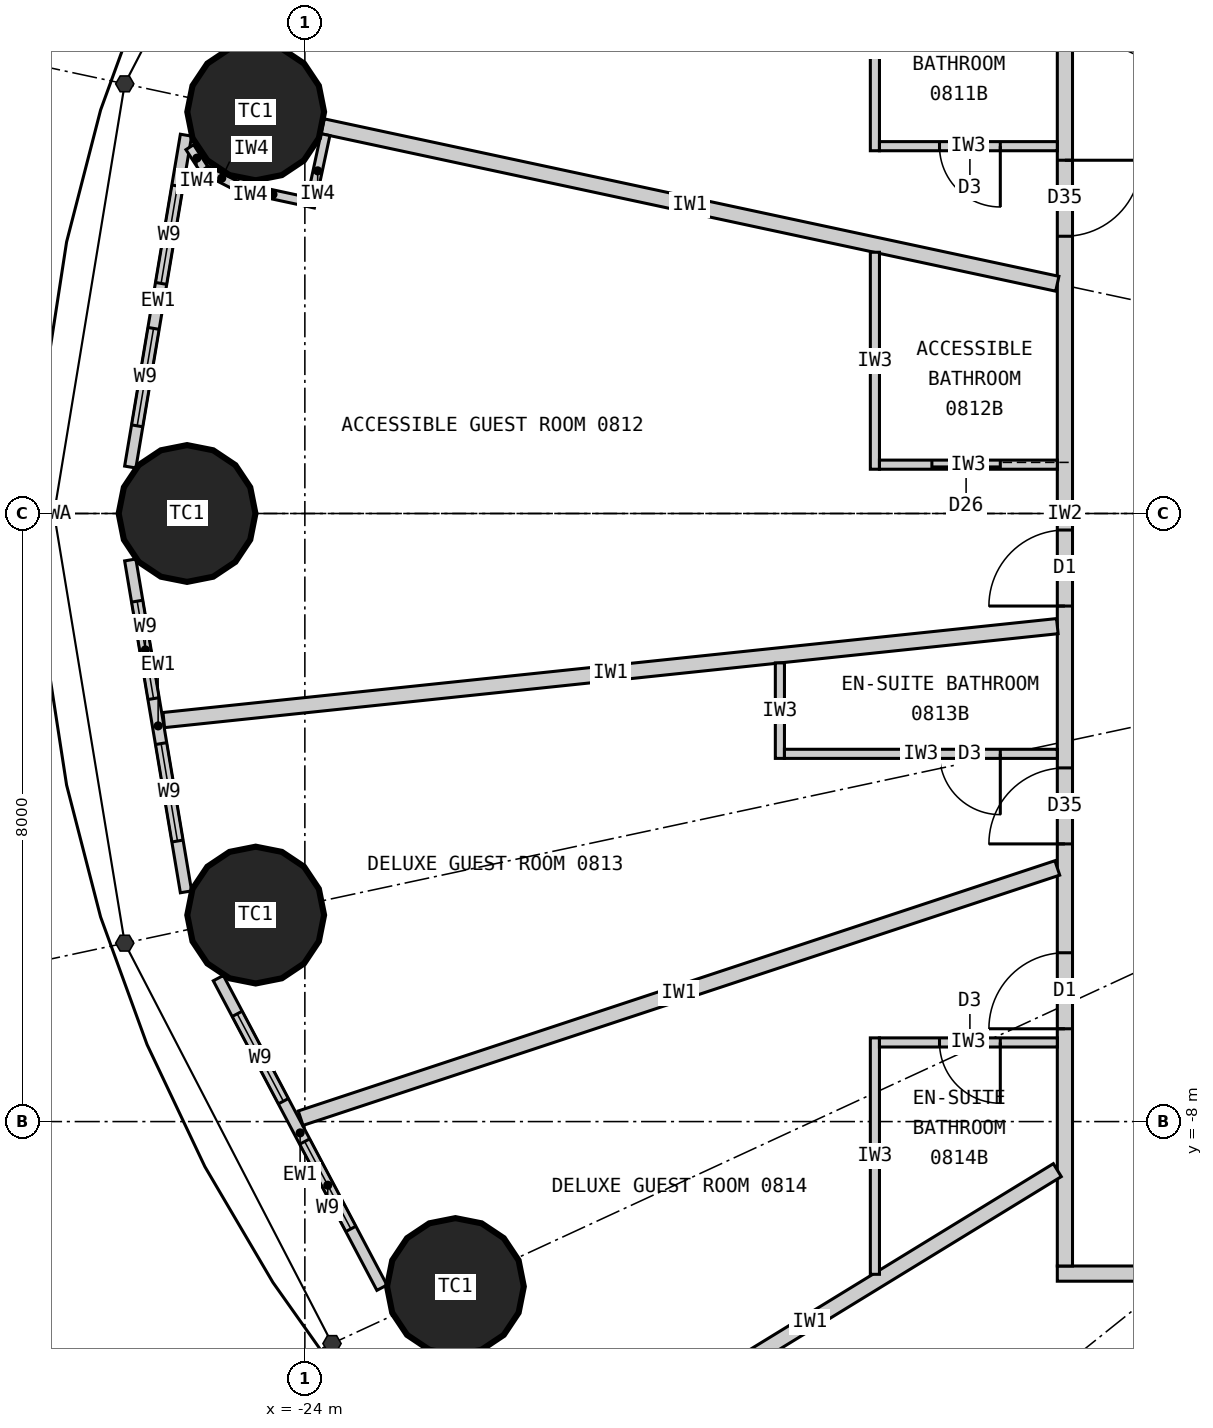
"""IFC4 building model, lengths in metres.
Left out: names, types, materials, properties, quantities, classifications, styles, units other than length and angle.
Written with IfcOpenShell. Run it as: python <this file> out.ifc"""

import sys

from ifc_helpers import new_model, si_unit, direction, frame, frame_2d, origin, origin_2d, place, context, subcontext, project, spatial, rectangle, circle, extrude, element, fill, save


model = new_model("IFC4")
c1 = context("Model", 3, precision=1e-05, world=origin(), true_north=direction((0.0, 1.0)))
c2 = subcontext(c1, "Body", "Model", "MODEL_VIEW")
j1 = project(units=[si_unit("LENGTHUNIT", "METRE"), si_unit("PLANEANGLEUNIT", "RADIAN")], contexts=[c1])
p1 = place(None, origin())
s1 = spatial("IfcSite", under=j1, at=p1, CompositionType="ELEMENT")
p2 = place(p1, origin())
s2 = spatial("IfcBuilding", under=s1, at=p2, CompositionType="ELEMENT")
p3 = place(p2, frame((0.0, 0.0, 39.3)))
s3 = spatial("IfcBuildingStorey", under=s2, at=p3, CompositionType="ELEMENT", Elevation=39.3)
for number, where, z_axis, x_axis in (
    (1, (-24.647, 5.283, 0.0), (0.0, 0.0, 1.0), (1.0, 0.0, 0.0)),
    (2, (-25.55, 0.0, 0.0), (0.0, 0.0, 1.0), (1.0, 0.0, 0.0)),
    (3, (-24.647, -5.283, 0.0), (0.0, 0.0, 1.0), (1.0, 0.0, 0.0)),
    (4, (-22.019, -10.17, 0.0), (0.0, 0.0, 1.0), (1.0, 0.0, 0.0)),
):
    element("IfcColumn", number, at=place(p3, frame(where, z_axis=z_axis, x_axis=x_axis)), inside=s3, PredefinedType="COLUMN", context=c2, shape_type="SweptSolid", body=[
        extrude(circle(Radius=0.9, at=origin_2d()), origin(), (0.0, 0.0, 1.0), 3.3),
    ])
p4 = place(p3, frame((-25.564, 4.978, 0.0), z_axis=(0.0, 0.0, 1.0), x_axis=(-0.165641751141, -0.986185991727, 0.0)))
e5 = element("IfcWall", 5, at=p4, inside=s3, PredefinedType="ELEMENTEDWALL", context=c2, shape_type="SweptSolid", body=[
    extrude(rectangle(XDim=4.428, YDim=0.15, at=frame_2d((2.214, 0.0))), origin(), (0.0, 0.0, 1.0), 3.12),
])
p5 = place(p4, frame((0.678, 0.0, 0.9)))
e6 = element("IfcOpeningElement", 6, at=p5, cuts=e5, PredefinedType="OPENING", context=c2, shape_type="SweptSolid", body=[
    extrude(rectangle(XDim=1.3, YDim=1.9, at=frame_2d((0.65, 0.95))), frame((0.0, 0.085, 0.0), z_axis=(0.0, -1.0, 0.0), x_axis=(1.0, 0.0, 0.0)), (0.0, 0.0, 1.0), 0.17),
])
p6 = place(p4, frame((2.578, 0.0, 0.9)))
e7 = element("IfcOpeningElement", 7, at=p6, cuts=e5, PredefinedType="OPENING", context=c2, shape_type="SweptSolid", body=[
    extrude(rectangle(XDim=1.3, YDim=1.9, at=frame_2d((0.65, 0.95))), frame((0.0, 0.085, 0.0), z_axis=(0.0, -1.0, 0.0), x_axis=(1.0, 0.0, 0.0)), (0.0, 0.0, 1.0), 0.17),
])
p7 = place(p3, frame((-26.297, -0.611, 0.0), z_axis=(0.0, 0.0, 1.0), x_axis=(0.165641751141, -0.986185991727, 0.0)))
e8 = element("IfcWall", 8, at=p7, inside=s3, PredefinedType="ELEMENTEDWALL", context=c2, shape_type="SweptSolid", body=[
    extrude(rectangle(XDim=4.428, YDim=0.15, at=frame_2d((2.214, 0.0))), origin(), (0.0, 0.0, 1.0), 3.12),
])
p8 = place(p7, frame((0.55, 0.0, 0.9)))
e9 = element("IfcOpeningElement", 9, at=p8, cuts=e8, PredefinedType="OPENING", context=c2, shape_type="SweptSolid", body=[
    extrude(rectangle(XDim=1.3, YDim=1.9, at=frame_2d((0.65, 0.95))), frame((0.0, 0.085, 0.0), z_axis=(0.0, -1.0, 0.0), x_axis=(1.0, 0.0, 0.0)), (0.0, 0.0, 1.0), 0.17),
])
p9 = place(p7, frame((2.45, 0.0, 0.9)))
e10 = element("IfcOpeningElement", 10, at=p9, cuts=e8, PredefinedType="OPENING", context=c2, shape_type="SweptSolid", body=[
    extrude(rectangle(XDim=1.3, YDim=1.9, at=frame_2d((0.65, 0.95))), frame((0.0, 0.085, 0.0), z_axis=(0.0, -1.0, 0.0), x_axis=(1.0, 0.0, 0.0)), (0.0, 0.0, 1.0), 0.17),
])
p10 = place(p3, frame((-25.139, -6.113, 0.0), z_axis=(0.0, 0.0, 1.0), x_axis=(0.467303182954, -0.884097129959, 0.0)))
e11 = element("IfcWall", 11, at=p10, inside=s3, PredefinedType="ELEMENTEDWALL", context=c2, shape_type="SweptSolid", body=[
    extrude(rectangle(XDim=4.606, YDim=0.15, at=frame_2d((2.303, 0.0))), origin(), (0.0, 0.0, 1.0), 3.12),
])
p11 = place(p10, frame((0.531, 0.0, 0.9)))
e12 = element("IfcOpeningElement", 12, at=p11, cuts=e11, PredefinedType="OPENING", context=c2, shape_type="SweptSolid", body=[
    extrude(rectangle(XDim=1.3, YDim=1.9, at=frame_2d((0.65, 0.95))), frame((0.0, 0.085, 0.0), z_axis=(0.0, -1.0, 0.0), x_axis=(1.0, 0.0, 0.0)), (0.0, 0.0, 1.0), 0.17),
])
p12 = place(p10, frame((2.432, 0.0, 0.9)))
e13 = element("IfcOpeningElement", 13, at=p12, cuts=e11, PredefinedType="OPENING", context=c2, shape_type="SweptSolid", body=[
    extrude(rectangle(XDim=1.3, YDim=1.9, at=frame_2d((0.65, 0.95))), frame((0.0, 0.085, 0.0), z_axis=(0.0, -1.0, 0.0), x_axis=(1.0, 0.0, 0.0)), (0.0, 0.0, 1.0), 0.17),
])
p13 = place(p3, frame((14.1, -10.0, 0.0), z_axis=(0.0, 0.0, 1.0), x_axis=(-1.0, 0.0, 0.0)))
e14 = element("IfcWall", 14, at=p13, inside=s3, PredefinedType="PARTITIONING", context=c2, shape_type="SweptSolid", body=[
    extrude(rectangle(XDim=28.2, YDim=0.2, at=frame_2d((14.1, 0.0))), origin(), (0.0, 0.0, 1.0), 3.12),
])
p14 = place(p13, frame((21.948, 0.0, 0.0)))
e15 = element("IfcOpeningElement", 15, at=p14, cuts=e14, PredefinedType="OPENING", context=c2, shape_type="SweptSolid", body=[
    extrude(rectangle(XDim=1.0, YDim=2.2, at=frame_2d((0.5, 1.1))), frame((0.0, 0.11, 0.0), z_axis=(0.0, -1.0, 0.0), x_axis=(1.0, 0.0, 0.0)), (0.0, 0.0, 1.0), 0.22),
])
p15 = place(p13, frame((15.684, 0.0, 0.0)))
e16 = element("IfcOpeningElement", 16, at=p15, cuts=e14, PredefinedType="OPENING", context=c2, shape_type="SweptSolid", body=[
    extrude(rectangle(XDim=1.0, YDim=2.2, at=frame_2d((0.5, 1.1))), frame((0.0, 0.11, 0.0), z_axis=(0.0, -1.0, 0.0), x_axis=(1.0, 0.0, 0.0)), (0.0, 0.0, 1.0), 0.22),
])
p16 = place(p13, frame((8.875, 0.0, 0.0)))
e17 = element("IfcOpeningElement", 17, at=p16, cuts=e14, PredefinedType="OPENING", context=c2, shape_type="SweptSolid", body=[
    extrude(rectangle(XDim=1.0, YDim=2.2, at=frame_2d((0.5, 1.1))), frame((0.0, 0.11, 0.0), z_axis=(0.0, -1.0, 0.0), x_axis=(1.0, 0.0, 0.0)), (0.0, 0.0, 1.0), 0.22),
])
p17 = place(p3, frame((-14.0, 9.9, 0.0), z_axis=(0.0, 0.0, 1.0), x_axis=(0.0, -1.0, 0.0)))
e18 = element("IfcWall", 18, at=p17, inside=s3, PredefinedType="PARTITIONING", context=c2, shape_type="SweptSolid", body=[
    extrude(rectangle(XDim=19.8, YDim=0.2, at=frame_2d((9.9, 0.0))), origin(), (0.0, 0.0, 1.0), 3.12),
])
p18 = place(p17, frame((0.103, 0.0, 0.0)))
e19 = element("IfcOpeningElement", 19, at=p18, cuts=e18, PredefinedType="OPENING", context=c2, shape_type="SweptSolid", body=[
    extrude(rectangle(XDim=1.0, YDim=2.2, at=frame_2d((0.5, 1.1))), frame((0.0, 0.11, 0.0), z_axis=(0.0, -1.0, 0.0), x_axis=(1.0, 0.0, 0.0)), (0.0, 0.0, 1.0), 0.22),
])
p19 = place(p17, frame((5.252, 0.0, 0.0)))
e20 = element("IfcOpeningElement", 20, at=p19, cuts=e18, PredefinedType="OPENING", context=c2, shape_type="SweptSolid", body=[
    extrude(rectangle(XDim=1.0, YDim=2.0, at=frame_2d((0.5, 1.0))), frame((0.0, 0.11, 0.0), z_axis=(0.0, -1.0, 0.0), x_axis=(1.0, 0.0, 0.0)), (0.0, 0.0, 1.0), 0.22),
])
p20 = place(p17, frame((10.117, 0.0, 0.0)))
e21 = element("IfcOpeningElement", 21, at=p20, cuts=e18, PredefinedType="OPENING", context=c2, shape_type="SweptSolid", body=[
    extrude(rectangle(XDim=1.0, YDim=2.2, at=frame_2d((0.5, 1.1))), frame((0.0, 0.11, 0.0), z_axis=(0.0, -1.0, 0.0), x_axis=(1.0, 0.0, 0.0)), (0.0, 0.0, 1.0), 0.22),
])
p21 = place(p17, frame((13.247, 0.0, 0.0)))
e22 = element("IfcOpeningElement", 22, at=p21, cuts=e18, PredefinedType="OPENING", context=c2, shape_type="SweptSolid", body=[
    extrude(rectangle(XDim=1.0, YDim=2.0, at=frame_2d((0.5, 1.0))), frame((0.0, 0.11, 0.0), z_axis=(0.0, -1.0, 0.0), x_axis=(1.0, 0.0, 0.0)), (0.0, 0.0, 1.0), 0.22),
])
p22 = place(p17, frame((15.679, 0.0, 0.0)))
e23 = element("IfcOpeningElement", 23, at=p22, cuts=e18, PredefinedType="OPENING", context=c2, shape_type="SweptSolid", body=[
    extrude(rectangle(XDim=1.0, YDim=2.2, at=frame_2d((0.5, 1.1))), frame((0.0, 0.11, 0.0), z_axis=(0.0, -1.0, 0.0), x_axis=(1.0, 0.0, 0.0)), (0.0, 0.0, 1.0), 0.22),
])
p23 = place(p3, frame((-14.1, 3.022, 0.0), z_axis=(0.0, 0.0, 1.0), x_axis=(-0.977786510688, 0.209603290805, 0.0)))
e24 = element("IfcWall", 24, at=p23, inside=s3, PredefinedType="PARTITIONING", context=c2, shape_type="SweptSolid", body=[
    extrude(rectangle(XDim=9.887, YDim=0.2, at=frame_2d((4.943, 0.0))), origin(), (0.0, 0.0, 1.0), 2.32),
])
p24 = place(p3, frame((-14.1, -1.482, 0.0), z_axis=(0.0, 0.0, 1.0), x_axis=(-0.994522076235, -0.104526742422, 0.0)))
e25 = element("IfcWall", 25, at=p24, inside=s3, PredefinedType="PARTITIONING", context=c2, shape_type="SweptSolid", body=[
    extrude(rectangle(XDim=11.821, YDim=0.2, at=frame_2d((5.91, 0.0))), origin(), (0.0, 0.0, 1.0), 2.32),
])
p25 = place(p3, frame((-14.1, -4.663, 0.0), z_axis=(0.0, 0.0, 1.0), x_axis=(-0.949432655039, -0.31397075269, 0.0)))
e26 = element("IfcWall", 26, at=p25, inside=s3, PredefinedType="PARTITIONING", context=c2, shape_type="SweptSolid", body=[
    extrude(rectangle(XDim=10.486, YDim=0.2, at=frame_2d((5.243, 0.0))), origin(), (0.0, 0.0, 1.0), 3.12),
])
p26 = place(p3, frame((-14.1, -8.639, 0.0), z_axis=(0.0, 0.0, 1.0), x_axis=(-0.852672493023, -0.522445805459, 0.0)))
e27 = element("IfcWall", 27, at=p26, inside=s3, PredefinedType="PARTITIONING", context=c2, shape_type="SweptSolid", body=[
    extrude(rectangle(XDim=7.633, YDim=0.2, at=frame_2d((3.817, 0.0))), origin(), (0.0, 0.0, 1.0), 3.12),
])
p27 = place(p3, frame((-16.5, 7.521, 0.0), z_axis=(0.0, 0.0, 1.0), x_axis=(0.0, -1.0, 0.0)))
e28 = element("IfcWall", 28, at=p27, inside=s3, PredefinedType="PARTITIONING", context=c2, shape_type="SweptSolid", body=[
    extrude(rectangle(XDim=2.749, YDim=0.12, at=frame_2d((1.374, 0.0))), origin(), (0.0, 0.0, 1.0), 3.12),
])
p28 = place(p3, frame((-14.1, 4.833, 0.0), z_axis=(0.0, 0.0, 1.0), x_axis=(-1.0, 0.0, 0.0)))
e29 = element("IfcWall", 29, at=p28, inside=s3, PredefinedType="PARTITIONING", context=c2, shape_type="SweptSolid", body=[
    extrude(rectangle(XDim=2.34, YDim=0.12, at=frame_2d((1.17, 0.0))), origin(), (0.0, 0.0, 1.0), 3.12),
])
p29 = place(p28, frame((0.75, 0.0, 0.0)))
e30 = element("IfcOpeningElement", 30, at=p29, cuts=e29, PredefinedType="OPENING", context=c2, shape_type="SweptSolid", body=[
    extrude(rectangle(XDim=0.8, YDim=2.1, at=frame_2d((0.4, 1.05))), frame((0.0, 0.07, 0.0), z_axis=(0.0, -1.0, 0.0), x_axis=(1.0, 0.0, 0.0)), (0.0, 0.0, 1.0), 0.14),
])
p30 = place(p3, frame((-16.5, 3.437, 0.0), z_axis=(0.0, 0.0, 1.0), x_axis=(0.0, -1.0, 0.0)))
e31 = element("IfcWall", 31, at=p30, inside=s3, PredefinedType="PARTITIONING", context=c2, shape_type="SweptSolid", body=[
    extrude(rectangle(XDim=2.854, YDim=0.12, at=frame_2d((1.427, 0.0))), origin(), (0.0, 0.0, 1.0), 3.12),
])
p31 = place(p3, frame((-14.1, 0.643, 0.0), z_axis=(0.0, 0.0, 1.0), x_axis=(-1.0, 0.0, 0.0)))
e32 = element("IfcWall", 32, at=p31, inside=s3, PredefinedType="PARTITIONING", context=c2, shape_type="SweptSolid", body=[
    extrude(rectangle(XDim=2.34, YDim=0.12, at=frame_2d((1.17, 0.0))), origin(), (0.0, 0.0, 1.0), 3.12),
])
p32 = place(p31, frame((0.75, 0.0, 0.0)))
e33 = element("IfcOpeningElement", 33, at=p32, cuts=e32, PredefinedType="OPENING", context=c2, shape_type="SweptSolid", body=[
    extrude(rectangle(XDim=0.9, YDim=2.1, at=frame_2d((0.45, 1.05))), frame((0.0, 0.07, 0.0), z_axis=(0.0, -1.0, 0.0), x_axis=(1.0, 0.0, 0.0)), (0.0, 0.0, 1.0), 0.14),
])
p33 = place(p3, frame((-17.75, -1.966, 0.0), z_axis=(0.0, 0.0, 1.0), x_axis=(0.0, -1.0, 0.0)))
e34 = element("IfcWall", 34, at=p33, inside=s3, PredefinedType="PARTITIONING", context=c2, shape_type="SweptSolid", body=[
    extrude(rectangle(XDim=1.256, YDim=0.12, at=frame_2d((0.628, 0.0))), origin(), (0.0, 0.0, 1.0), 3.12),
])
p34 = place(p3, frame((-14.1, -3.162, 0.0), z_axis=(0.0, 0.0, 1.0), x_axis=(-1.0, 0.0, 0.0)))
e35 = element("IfcWall", 35, at=p34, inside=s3, PredefinedType="PARTITIONING", context=c2, shape_type="SweptSolid", body=[
    extrude(rectangle(XDim=3.59, YDim=0.12, at=frame_2d((1.795, 0.0))), origin(), (0.0, 0.0, 1.0), 3.12),
])
p35 = place(p34, frame((0.75, 0.0, 0.0)))
e36 = element("IfcOpeningElement", 36, at=p35, cuts=e35, PredefinedType="OPENING", context=c2, shape_type="SweptSolid", body=[
    extrude(rectangle(XDim=0.8, YDim=2.1, at=frame_2d((0.4, 1.05))), frame((0.0, 0.07, 0.0), z_axis=(0.0, -1.0, 0.0), x_axis=(1.0, 0.0, 0.0)), (0.0, 0.0, 1.0), 0.14),
])
p36 = place(p3, frame((-16.5, -10.01, 0.0), z_axis=(0.0, 0.0, 1.0), x_axis=(0.0, 1.0, 0.0)))
e37 = element("IfcWall", 37, at=p36, inside=s3, PredefinedType="PARTITIONING", context=c2, shape_type="SweptSolid", body=[
    extrude(rectangle(XDim=3.111, YDim=0.12, at=frame_2d((1.555, 0.0))), origin(), (0.0, 0.0, 1.0), 3.12),
])
p37 = place(p3, frame((-14.1, -6.959, 0.0), z_axis=(0.0, 0.0, 1.0), x_axis=(-1.0, 0.0, 0.0)))
e38 = element("IfcWall", 38, at=p37, inside=s3, PredefinedType="PARTITIONING", context=c2, shape_type="SweptSolid", body=[
    extrude(rectangle(XDim=2.34, YDim=0.12, at=frame_2d((1.17, 0.0))), origin(), (0.0, 0.0, 1.0), 3.12),
])
p38 = place(p37, frame((0.75, 0.0, 0.0)))
e39 = element("IfcOpeningElement", 39, at=p38, cuts=e38, PredefinedType="OPENING", context=c2, shape_type="SweptSolid", body=[
    extrude(rectangle(XDim=0.8, YDim=2.1, at=frame_2d((0.4, 1.05))), frame((0.0, 0.07, 0.0), z_axis=(0.0, -1.0, 0.0), x_axis=(1.0, 0.0, 0.0)), (0.0, 0.0, 1.0), 0.14),
])
p39 = place(p3, frame((-23.729, 4.984, 0.0), z_axis=(0.0, 0.0, 1.0), x_axis=(-0.20968306268, -0.977769406979, 0.0)))
e40 = element("IfcWall", 40, at=p39, inside=s3, PredefinedType="PARTITIONING", context=c2, shape_type="SweptSolid", body=[
    extrude(rectangle(XDim=0.975, YDim=0.12, at=frame_2d((0.487, 0.0))), origin(), (0.0, 0.0, 1.0), 3.12),
])
p40 = place(p3, frame((-23.98, 4.103, 0.0), z_axis=(0.0, 0.0, 1.0), x_axis=(-0.977762694187, 0.209714362543, 0.0)))
e41 = element("IfcWall", 41, at=p40, inside=s3, PredefinedType="PARTITIONING", context=c2, shape_type="SweptSolid", body=[
    extrude(rectangle(XDim=0.9, YDim=0.12, at=frame_2d((0.45, 0.0))), origin(), (0.0, 0.0, 1.0), 3.12),
])
p41 = place(p3, frame((-24.86, 4.291, 0.0), z_axis=(0.0, 0.0, 1.0), x_axis=(-0.890204323062, 0.455561481254, 0.0)))
e42 = element("IfcWall", 42, at=p41, inside=s3, PredefinedType="PARTITIONING", context=c2, shape_type="SweptSolid", body=[
    extrude(rectangle(XDim=0.525, YDim=0.12, at=frame_2d((0.263, 0.0))), origin(), (0.0, 0.0, 1.0), 3.12),
])
p42 = place(p3, frame((-25.327, 4.531, 0.0), z_axis=(0.0, 0.0, 1.0), x_axis=(-0.543516034791, 0.839398784801, 0.0)))
e43 = element("IfcWall", 43, at=p42, inside=s3, PredefinedType="PARTITIONING", context=c2, shape_type="SweptSolid", body=[
    extrude(rectangle(XDim=0.344, YDim=0.12, at=frame_2d((0.172, 0.0))), origin(), (0.0, 0.0, 1.0), 3.12),
])
p43 = place(p5, origin())
e44 = element("IfcWindow", 44, at=p43, inside=s3, PartitioningType="SINGLE_PANEL", PredefinedType="WINDOW", context=c2, shape_type="SweptSolid", body=[
    extrude(rectangle(XDim=1.3, YDim=1.9, at=frame_2d((0.65, 0.95))), frame((0.0, 0.03, 0.0), z_axis=(0.0, -1.0, 0.0), x_axis=(1.0, 0.0, 0.0)), (0.0, 0.0, 1.0), 0.06),
])
fill(e6, e44)
p44 = place(p6, origin())
e45 = element("IfcWindow", 45, at=p44, inside=s3, PartitioningType="SINGLE_PANEL", PredefinedType="WINDOW", context=c2, shape_type="SweptSolid", body=[
    extrude(rectangle(XDim=1.3, YDim=1.9, at=frame_2d((0.65, 0.95))), frame((0.0, 0.03, 0.0), z_axis=(0.0, -1.0, 0.0), x_axis=(1.0, 0.0, 0.0)), (0.0, 0.0, 1.0), 0.06),
])
fill(e7, e45)
p45 = place(p8, origin())
e46 = element("IfcWindow", 46, at=p45, inside=s3, PartitioningType="SINGLE_PANEL", PredefinedType="WINDOW", context=c2, shape_type="SweptSolid", body=[
    extrude(rectangle(XDim=1.3, YDim=1.9, at=frame_2d((0.65, 0.95))), frame((0.0, 0.03, 0.0), z_axis=(0.0, -1.0, 0.0), x_axis=(1.0, 0.0, 0.0)), (0.0, 0.0, 1.0), 0.06),
])
fill(e9, e46)
p46 = place(p9, origin())
e47 = element("IfcWindow", 47, at=p46, inside=s3, PartitioningType="SINGLE_PANEL", PredefinedType="WINDOW", context=c2, shape_type="SweptSolid", body=[
    extrude(rectangle(XDim=1.3, YDim=1.9, at=frame_2d((0.65, 0.95))), frame((0.0, 0.03, 0.0), z_axis=(0.0, -1.0, 0.0), x_axis=(1.0, 0.0, 0.0)), (0.0, 0.0, 1.0), 0.06),
])
fill(e10, e47)
p47 = place(p11, origin())
e48 = element("IfcWindow", 48, at=p47, inside=s3, PartitioningType="SINGLE_PANEL", PredefinedType="WINDOW", context=c2, shape_type="SweptSolid", body=[
    extrude(rectangle(XDim=1.3, YDim=1.9, at=frame_2d((0.65, 0.95))), frame((0.0, 0.03, 0.0), z_axis=(0.0, -1.0, 0.0), x_axis=(1.0, 0.0, 0.0)), (0.0, 0.0, 1.0), 0.06),
])
fill(e12, e48)
p48 = place(p12, origin())
e49 = element("IfcWindow", 49, at=p48, inside=s3, PartitioningType="SINGLE_PANEL", PredefinedType="WINDOW", context=c2, shape_type="SweptSolid", body=[
    extrude(rectangle(XDim=1.3, YDim=1.9, at=frame_2d((0.65, 0.95))), frame((0.0, 0.03, 0.0), z_axis=(0.0, -1.0, 0.0), x_axis=(1.0, 0.0, 0.0)), (0.0, 0.0, 1.0), 0.06),
])
fill(e13, e49)
p49 = place(p29, origin())
e50 = element("IfcDoor", 50, at=p49, inside=s3, OperationType="SINGLE_SWING_LEFT", PredefinedType="DOOR", context=c2, shape_type="SweptSolid", body=[
    extrude(rectangle(XDim=0.8, YDim=2.1, at=frame_2d((0.4, 1.05))), frame((0.0, 0.025, 0.0), z_axis=(0.0, -1.0, 0.0), x_axis=(1.0, 0.0, 0.0)), (0.0, 0.0, 1.0), 0.05),
])
fill(e30, e50)
p50 = place(p19, origin())
e51 = element("IfcDoor", 51, at=p50, inside=s3, OperationType="SINGLE_SWING_LEFT", PredefinedType="DOOR", context=c2, shape_type="SweptSolid", body=[
    extrude(rectangle(XDim=1.0, YDim=2.0, at=frame_2d((0.5, 1.0))), frame((0.0, 0.025, 0.0), z_axis=(0.0, -1.0, 0.0), x_axis=(1.0, 0.0, 0.0)), (0.0, 0.0, 1.0), 0.05),
])
fill(e20, e51)
p51 = place(p32, origin())
e52 = element("IfcDoor", 52, at=p51, inside=s3, OperationType="SLIDING_TO_LEFT", PredefinedType="DOOR", context=c2, shape_type="SweptSolid", body=[
    extrude(rectangle(XDim=0.9, YDim=2.1, at=frame_2d((0.45, 1.05))), frame((0.0, 0.025, 0.0), z_axis=(0.0, -1.0, 0.0), x_axis=(1.0, 0.0, 0.0)), (0.0, 0.0, 1.0), 0.05),
])
fill(e33, e52)
p52 = place(p20, origin())
e53 = element("IfcDoor", 53, at=p52, inside=s3, OperationType="SINGLE_SWING_RIGHT", PredefinedType="DOOR", context=c2, shape_type="SweptSolid", body=[
    extrude(rectangle(XDim=1.0, YDim=2.2, at=frame_2d((0.5, 1.1))), frame((0.0, 0.025, 0.0), z_axis=(0.0, -1.0, 0.0), x_axis=(1.0, 0.0, 0.0)), (0.0, 0.0, 1.0), 0.05),
])
fill(e21, e53)
p53 = place(p35, origin())
e54 = element("IfcDoor", 54, at=p53, inside=s3, OperationType="SINGLE_SWING_LEFT", PredefinedType="DOOR", context=c2, shape_type="SweptSolid", body=[
    extrude(rectangle(XDim=0.8, YDim=2.1, at=frame_2d((0.4, 1.05))), frame((0.0, 0.025, 0.0), z_axis=(0.0, -1.0, 0.0), x_axis=(1.0, 0.0, 0.0)), (0.0, 0.0, 1.0), 0.05),
])
fill(e36, e54)
p54 = place(p21, origin())
e55 = element("IfcDoor", 55, at=p54, inside=s3, OperationType="SINGLE_SWING_RIGHT", PredefinedType="DOOR", context=c2, shape_type="SweptSolid", body=[
    extrude(rectangle(XDim=1.0, YDim=2.0, at=frame_2d((0.5, 1.0))), frame((0.0, 0.025, 0.0), z_axis=(0.0, -1.0, 0.0), x_axis=(1.0, 0.0, 0.0)), (0.0, 0.0, 1.0), 0.05),
])
fill(e22, e55)
p55 = place(p38, origin())
e56 = element("IfcDoor", 56, at=p55, inside=s3, OperationType="SINGLE_SWING_LEFT", PredefinedType="DOOR", context=c2, shape_type="SweptSolid", body=[
    extrude(rectangle(XDim=0.8, YDim=2.1, at=frame_2d((0.4, 1.05))), frame((0.0, 0.025, 0.0), z_axis=(0.0, -1.0, 0.0), x_axis=(1.0, 0.0, 0.0)), (0.0, 0.0, 1.0), 0.05),
])
fill(e39, e56)
p56 = place(p22, origin())
e57 = element("IfcDoor", 57, at=p56, inside=s3, OperationType="SINGLE_SWING_RIGHT", PredefinedType="DOOR", context=c2, shape_type="SweptSolid", body=[
    extrude(rectangle(XDim=1.0, YDim=2.2, at=frame_2d((0.5, 1.1))), frame((0.0, 0.025, 0.0), z_axis=(0.0, -1.0, 0.0), x_axis=(1.0, 0.0, 0.0)), (0.0, 0.0, 1.0), 0.05),
])
fill(e23, e57)
save(model, sys.argv[1])
